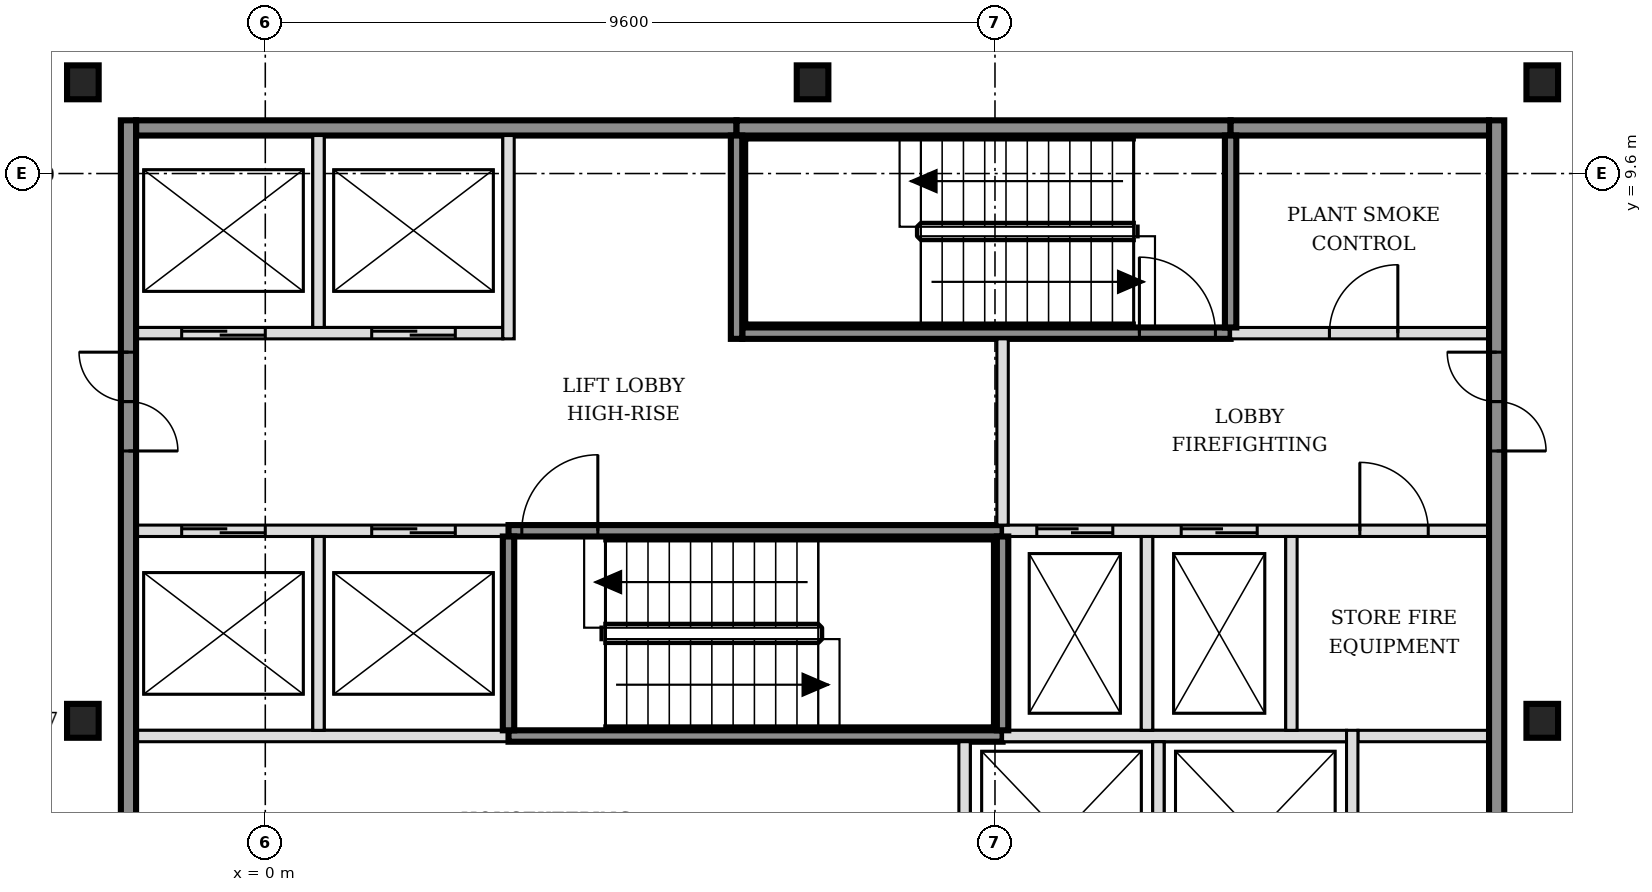
"""IFC4 building model, lengths in metres.
Left out: names, types, materials, properties, quantities, classifications, styles, units other than length and angle.
Written with IfcOpenShell. Run it as: python <this file> out.ifc"""

import sys

from ifc_helpers import new_model, si_unit, direction, frame, frame_2d, origin, origin_2d, place, context, subcontext, project, spatial, rectangle, i_section, extrude, element, fill, save


model = new_model("IFC4")
c1 = context("Model", 3, precision=1e-05, world=origin(), true_north=direction((0.0, 1.0)))
c2 = subcontext(c1, "Body", "Model", "MODEL_VIEW")
j1 = project(units=[si_unit("LENGTHUNIT", "METRE"), si_unit("PLANEANGLEUNIT", "RADIAN")], contexts=[c1])
p1 = place(None, origin())
s1 = spatial("IfcSite", under=j1, at=p1, CompositionType="ELEMENT")
p2 = place(p1, origin())
s2 = spatial("IfcBuilding", under=s1, at=p2, CompositionType="ELEMENT")
p3 = place(p2, frame((0.0, 0.0, 175.8)))
s3 = spatial("IfcBuildingStorey", under=s2, at=p3, CompositionType="ELEMENT", Elevation=175.8)
for number, where, z_axis, x_axis in (
    (1, (-2.4, 2.4, -0.15), (0.0, 0.0, 1.0), (1.0, 0.0, 0.0)),
    (2, (16.8, 2.4, -0.15), (0.0, 0.0, 1.0), (1.0, 0.0, 0.0)),
    (3, (-2.4, 10.8, -0.15), (0.0, 0.0, 1.0), (1.0, 0.0, 0.0)),
    (4, (7.2, 10.8, -0.15), (0.0, 0.0, 1.0), (1.0, 0.0, 0.0)),
    (5, (16.8, 10.8, -0.15), (0.0, 0.0, 1.0), (1.0, 0.0, 0.0)),
):
    element("IfcColumn", number, at=place(p3, frame(where, z_axis=z_axis, x_axis=x_axis)), inside=s3, PredefinedType="COLUMN", context=c2, shape_type="SweptSolid", body=[
        extrude(i_section(OverallWidth=0.416, OverallDepth=0.446, WebThickness=0.039, FlangeThickness=0.063, FilletRadius=0.015, at=origin_2d()), origin(), (0.0, 0.0, 1.0), 3.6),
    ])
p4 = place(p3, frame((-1.7, 2.2, 0.0), z_axis=(0.0, 0.0, 1.0), x_axis=(1.0, 0.0, 0.0)))
e6 = element("IfcWall", 6, at=p4, inside=s3, PredefinedType="SOLIDWALL", context=c2, shape_type="SweptSolid", body=[
    extrude(rectangle(XDim=4.9, YDim=0.15, at=frame_2d((2.45, 0.0))), origin(), (0.0, 0.0, 1.0), 3.45),
])
p5 = place(p3, frame((3.2, 2.2, 0.0), z_axis=(0.0, 0.0, 1.0), x_axis=(1.0, 0.0, 0.0)))
e7 = element("IfcWall", 7, at=p5, inside=s3, PredefinedType="SOLIDWALL", context=c2, shape_type="SweptSolid", body=[
    extrude(rectangle(XDim=6.5, YDim=0.15, at=frame_2d((3.25, 0.0))), origin(), (0.0, 0.0, 1.0), 3.45),
])
p6 = place(p3, frame((9.7, 2.2, 0.0), z_axis=(0.0, 0.0, 1.0), x_axis=(1.0, 0.0, 0.0)))
e8 = element("IfcWall", 8, at=p6, inside=s3, PredefinedType="SOLIDWALL", context=c2, shape_type="SweptSolid", body=[
    extrude(rectangle(XDim=4.525, YDim=0.15, at=frame_2d((2.263, 0.0))), origin(), (0.0, 0.0, 1.0), 3.45),
])
p7 = place(p3, frame((14.375, 2.2, 0.0), z_axis=(0.0, 0.0, 1.0), x_axis=(1.0, 0.0, 0.0)))
e9 = element("IfcWall", 9, at=p7, inside=s3, PredefinedType="PARTITIONING", context=c2, shape_type="SweptSolid", body=[
    extrude(rectangle(XDim=1.725, YDim=0.15, at=frame_2d((0.863, 0.0))), origin(), (0.0, 0.0, 1.0), 3.45),
])
p8 = place(p3, frame((-1.7, 4.9, 0.0), z_axis=(0.0, 0.0, 1.0), x_axis=(1.0, 0.0, 0.0)))
e10 = element("IfcWall", 10, at=p8, inside=s3, PredefinedType="SOLIDWALL", context=c2, shape_type="SweptSolid", body=[
    extrude(rectangle(XDim=4.9, YDim=0.15, at=frame_2d((2.45, 0.0))), origin(), (0.0, 0.0, 1.0), 3.45),
])
p9 = place(p8, frame((0.6, 0.0, 0.0)))
e11 = element("IfcOpeningElement", 11, at=p9, cuts=e10, PredefinedType="OPENING", context=c2, shape_type="SweptSolid", body=[
    extrude(rectangle(XDim=1.1, YDim=2.1, at=frame_2d((0.55, 1.05))), frame((0.0, 0.085, 0.0), z_axis=(0.0, -1.0, 0.0), x_axis=(1.0, 0.0, 0.0)), (0.0, 0.0, 1.0), 0.17),
])
p10 = place(p8, frame((3.1, 0.0, 0.0)))
e12 = element("IfcOpeningElement", 12, at=p10, cuts=e10, PredefinedType="OPENING", context=c2, shape_type="SweptSolid", body=[
    extrude(rectangle(XDim=1.1, YDim=2.1, at=frame_2d((0.55, 1.05))), frame((0.0, 0.085, 0.0), z_axis=(0.0, -1.0, 0.0), x_axis=(1.0, 0.0, 0.0)), (0.0, 0.0, 1.0), 0.17),
])
p11 = place(p3, frame((3.2, 4.9, 0.0), z_axis=(0.0, 0.0, 1.0), x_axis=(1.0, 0.0, 0.0)))
e13 = element("IfcWall", 13, at=p11, inside=s3, PredefinedType="SOLIDWALL", context=c2, shape_type="SweptSolid", body=[
    extrude(rectangle(XDim=6.5, YDim=0.15, at=frame_2d((3.25, 0.0))), origin(), (0.0, 0.0, 1.0), 3.45),
])
p12 = place(p11, frame((0.175, 0.0, 0.0)))
e14 = element("IfcOpeningElement", 14, at=p12, cuts=e13, PredefinedType="OPENING", context=c2, shape_type="SweptSolid", body=[
    extrude(rectangle(XDim=1.0, YDim=2.1, at=frame_2d((0.5, 1.05))), frame((0.0, 0.085, 0.0), z_axis=(0.0, -1.0, 0.0), x_axis=(1.0, 0.0, 0.0)), (0.0, 0.0, 1.0), 0.17),
])
p13 = place(p3, frame((9.7, 4.9, 0.0), z_axis=(0.0, 0.0, 1.0), x_axis=(1.0, 0.0, 0.0)))
e15 = element("IfcWall", 15, at=p13, inside=s3, PredefinedType="SOLIDWALL", context=c2, shape_type="SweptSolid", body=[
    extrude(rectangle(XDim=6.4, YDim=0.15, at=frame_2d((3.2, 0.0))), origin(), (0.0, 0.0, 1.0), 3.45),
])
p14 = place(p13, frame((0.45, 0.0, 0.0)))
e16 = element("IfcOpeningElement", 16, at=p14, cuts=e15, PredefinedType="OPENING", context=c2, shape_type="SweptSolid", body=[
    extrude(rectangle(XDim=1.0, YDim=2.1, at=frame_2d((0.5, 1.05))), frame((0.0, 0.085, 0.0), z_axis=(0.0, -1.0, 0.0), x_axis=(1.0, 0.0, 0.0)), (0.0, 0.0, 1.0), 0.17),
])
p15 = place(p13, frame((2.35, 0.0, 0.0)))
e17 = element("IfcOpeningElement", 17, at=p15, cuts=e15, PredefinedType="OPENING", context=c2, shape_type="SweptSolid", body=[
    extrude(rectangle(XDim=1.0, YDim=2.1, at=frame_2d((0.5, 1.05))), frame((0.0, 0.085, 0.0), z_axis=(0.0, -1.0, 0.0), x_axis=(1.0, 0.0, 0.0)), (0.0, 0.0, 1.0), 0.17),
])
p16 = place(p13, frame((4.7, 0.0, 0.0)))
e18 = element("IfcOpeningElement", 18, at=p16, cuts=e15, PredefinedType="OPENING", context=c2, shape_type="SweptSolid", body=[
    extrude(rectangle(XDim=0.9, YDim=2.1, at=frame_2d((0.45, 1.05))), frame((0.0, 0.085, 0.0), z_axis=(0.0, -1.0, 0.0), x_axis=(1.0, 0.0, 0.0)), (0.0, 0.0, 1.0), 0.17),
])
p17 = place(p3, frame((-1.7, 7.5, 0.0), z_axis=(0.0, 0.0, 1.0), x_axis=(1.0, 0.0, 0.0)))
e19 = element("IfcWall", 19, at=p17, inside=s3, PredefinedType="SOLIDWALL", context=c2, shape_type="SweptSolid", body=[
    extrude(rectangle(XDim=4.825, YDim=0.15, at=frame_2d((2.413, 0.0))), origin(), (0.0, 0.0, 1.0), 3.45),
])
p18 = place(p17, frame((0.6, 0.0, 0.0)))
e20 = element("IfcOpeningElement", 20, at=p18, cuts=e19, PredefinedType="OPENING", context=c2, shape_type="SweptSolid", body=[
    extrude(rectangle(XDim=1.1, YDim=2.1, at=frame_2d((0.55, 1.05))), frame((0.0, 0.085, 0.0), z_axis=(0.0, -1.0, 0.0), x_axis=(1.0, 0.0, 0.0)), (0.0, 0.0, 1.0), 0.17),
])
p19 = place(p17, frame((3.1, 0.0, 0.0)))
e21 = element("IfcOpeningElement", 21, at=p19, cuts=e19, PredefinedType="OPENING", context=c2, shape_type="SweptSolid", body=[
    extrude(rectangle(XDim=1.1, YDim=2.1, at=frame_2d((0.55, 1.05))), frame((0.0, 0.085, 0.0), z_axis=(0.0, -1.0, 0.0), x_axis=(1.0, 0.0, 0.0)), (0.0, 0.0, 1.0), 0.17),
])
p20 = place(p3, frame((6.275, 7.5, 0.0), z_axis=(0.0, 0.0, 1.0), x_axis=(1.0, 0.0, 0.0)))
e22 = element("IfcWall", 22, at=p20, inside=s3, PredefinedType="SOLIDWALL", context=c2, shape_type="SweptSolid", body=[
    extrude(rectangle(XDim=6.425, YDim=0.15, at=frame_2d((3.212, 0.0))), origin(), (0.0, 0.0, 1.0), 3.45),
])
p21 = place(p20, frame((5.225, 0.0, 0.0)))
e23 = element("IfcOpeningElement", 23, at=p21, cuts=e22, PredefinedType="OPENING", context=c2, shape_type="SweptSolid", body=[
    extrude(rectangle(XDim=1.0, YDim=2.1, at=frame_2d((0.5, 1.05))), frame((0.0, 0.085, 0.0), z_axis=(0.0, -1.0, 0.0), x_axis=(1.0, 0.0, 0.0)), (0.0, 0.0, 1.0), 0.17),
])
p22 = place(p3, frame((12.7, 7.5, 0.0), z_axis=(0.0, 0.0, 1.0), x_axis=(1.0, 0.0, 0.0)))
e24 = element("IfcWall", 24, at=p22, inside=s3, PredefinedType="SOLIDWALL", context=c2, shape_type="SweptSolid", body=[
    extrude(rectangle(XDim=3.4, YDim=0.15, at=frame_2d((1.7, 0.0))), origin(), (0.0, 0.0, 1.0), 3.45),
])
p23 = place(p22, frame((1.3, 0.0, 0.0)))
e25 = element("IfcOpeningElement", 25, at=p23, cuts=e24, PredefinedType="OPENING", context=c2, shape_type="SweptSolid", body=[
    extrude(rectangle(XDim=0.9, YDim=2.1, at=frame_2d((0.45, 1.05))), frame((0.0, 0.085, 0.0), z_axis=(0.0, -1.0, 0.0), x_axis=(1.0, 0.0, 0.0)), (0.0, 0.0, 1.0), 0.17),
])
p24 = place(p3, frame((-1.7, 10.2, 0.0), z_axis=(0.0, 0.0, 1.0), x_axis=(1.0, 0.0, 0.0)))
e26 = element("IfcWall", 26, at=p24, inside=s3, PredefinedType="SOLIDWALL", context=c2, shape_type="SweptSolid", body=[
    extrude(rectangle(XDim=7.9, YDim=0.2, at=frame_2d((3.95, 0.0))), origin(), (0.0, 0.0, 1.0), 3.45),
])
p25 = place(p3, frame((6.2, 10.2, 0.0), z_axis=(0.0, 0.0, 1.0), x_axis=(1.0, 0.0, 0.0)))
e27 = element("IfcWall", 27, at=p25, inside=s3, PredefinedType="SOLIDWALL", context=c2, shape_type="SweptSolid", body=[
    extrude(rectangle(XDim=6.5, YDim=0.2, at=frame_2d((3.25, 0.0))), origin(), (0.0, 0.0, 1.0), 3.45),
])
p26 = place(p3, frame((12.7, 10.2, 0.0), z_axis=(0.0, 0.0, 1.0), x_axis=(1.0, 0.0, 0.0)))
e28 = element("IfcWall", 28, at=p26, inside=s3, PredefinedType="SOLIDWALL", context=c2, shape_type="SweptSolid", body=[
    extrude(rectangle(XDim=3.4, YDim=0.2, at=frame_2d((1.7, 0.0))), origin(), (0.0, 0.0, 1.0), 3.45),
])
p27 = place(p3, frame((-1.8, -5.5, 0.0), z_axis=(0.0, 0.0, 1.0), x_axis=(0.0, 1.0, 0.0)))
e29 = element("IfcWall", 29, at=p27, inside=s3, PredefinedType="SOLIDWALL", context=c2, shape_type="SweptSolid", body=[
    extrude(rectangle(XDim=15.8, YDim=0.2, at=frame_2d((7.9, 0.0))), origin(), (0.0, 0.0, 1.0), 3.45),
])
p28 = place(p27, frame((3.05, 0.0, 0.0)))
e30 = element("IfcOpeningElement", 30, at=p28, cuts=e29, PredefinedType="OPENING", context=c2, shape_type="SweptSolid", body=[
    extrude(rectangle(XDim=1.3, YDim=2.1, at=frame_2d((0.65, 1.05))), frame((0.0, 0.11, 0.0), z_axis=(0.0, -1.0, 0.0), x_axis=(1.0, 0.0, 0.0)), (0.0, 0.0, 1.0), 0.22),
])
p29 = place(p27, frame((11.45, 0.0, 0.0)))
e31 = element("IfcOpeningElement", 31, at=p29, cuts=e29, PredefinedType="OPENING", context=c2, shape_type="SweptSolid", body=[
    extrude(rectangle(XDim=1.3, YDim=2.1, at=frame_2d((0.65, 1.05))), frame((0.0, 0.11, 0.0), z_axis=(0.0, -1.0, 0.0), x_axis=(1.0, 0.0, 0.0)), (0.0, 0.0, 1.0), 0.22),
])
p30 = place(p3, frame((0.7, 2.275, 0.0), z_axis=(0.0, 0.0, 1.0), x_axis=(0.0, 1.0, 0.0)))
e32 = element("IfcWall", 32, at=p30, inside=s3, PredefinedType="SOLIDWALL", context=c2, shape_type="SweptSolid", body=[
    extrude(rectangle(XDim=2.55, YDim=0.15, at=frame_2d((1.275, 0.0))), origin(), (0.0, 0.0, 1.0), 3.45),
])
p31 = place(p3, frame((0.7, 7.575, 0.0), z_axis=(0.0, 0.0, 1.0), x_axis=(0.0, 1.0, 0.0)))
e33 = element("IfcWall", 33, at=p31, inside=s3, PredefinedType="SOLIDWALL", context=c2, shape_type="SweptSolid", body=[
    extrude(rectangle(XDim=2.525, YDim=0.15, at=frame_2d((1.263, 0.0))), origin(), (0.0, 0.0, 1.0), 3.45),
])
p32 = place(p3, frame((3.2, 2.275, 0.0), z_axis=(0.0, 0.0, 1.0), x_axis=(0.0, 1.0, 0.0)))
e34 = element("IfcWall", 34, at=p32, inside=s3, PredefinedType="SOLIDWALL", context=c2, shape_type="SweptSolid", body=[
    extrude(rectangle(XDim=2.55, YDim=0.15, at=frame_2d((1.275, 0.0))), origin(), (0.0, 0.0, 1.0), 3.45),
])
for number, where, z_axis, x_axis in (
    (35, (3.2, 7.425, 0.0), (0.0, 0.0, 1.0), (0.0, 1.0, 0.0)),
    (36, (6.2, 7.425, 0.0), (0.0, 0.0, 1.0), (0.0, 1.0, 0.0)),
):
    element("IfcWall", number, at=place(p3, frame(where, z_axis=z_axis, x_axis=x_axis)), inside=s3, PredefinedType="SOLIDWALL", context=c2, shape_type="SweptSolid", body=[
        extrude(rectangle(XDim=2.675, YDim=0.15, at=frame_2d((1.337, 0.0))), origin(), (0.0, 0.0, 1.0), 3.45),
    ])
p33 = place(p3, frame((9.2, -0.475, 0.0), z_axis=(0.0, 0.0, 1.0), x_axis=(0.0, 1.0, 0.0)))
e37 = element("IfcWall", 37, at=p33, inside=s3, PredefinedType="SOLIDWALL", context=c2, shape_type="SweptSolid", body=[
    extrude(rectangle(XDim=2.6, YDim=0.15, at=frame_2d((1.3, 0.0))), origin(), (0.0, 0.0, 1.0), 3.45),
])
p34 = place(p3, frame((9.7, 2.275, 0.0), z_axis=(0.0, 0.0, 1.0), x_axis=(0.0, 1.0, 0.0)))
e38 = element("IfcWall", 38, at=p34, inside=s3, PredefinedType="SOLIDWALL", context=c2, shape_type="SweptSolid", body=[
    extrude(rectangle(XDim=2.55, YDim=0.15, at=frame_2d((1.275, 0.0))), origin(), (0.0, 0.0, 1.0), 3.45),
])
p35 = place(p3, frame((9.7, 4.975, 0.0), z_axis=(0.0, 0.0, 1.0), x_axis=(0.0, 1.0, 0.0)))
e39 = element("IfcWall", 39, at=p35, inside=s3, PredefinedType="SOLIDWALL", context=c2, shape_type="SweptSolid", body=[
    extrude(rectangle(XDim=2.45, YDim=0.15, at=frame_2d((1.225, 0.0))), origin(), (0.0, 0.0, 1.0), 3.45),
])
p36 = place(p3, frame((11.6, 2.275, 0.0), z_axis=(0.0, 0.0, 1.0), x_axis=(0.0, 1.0, 0.0)))
e40 = element("IfcWall", 40, at=p36, inside=s3, PredefinedType="SOLIDWALL", context=c2, shape_type="SweptSolid", body=[
    extrude(rectangle(XDim=2.55, YDim=0.15, at=frame_2d((1.275, 0.0))), origin(), (0.0, 0.0, 1.0), 3.45),
])
p37 = place(p3, frame((11.75, -0.325, 0.0), z_axis=(0.0, 0.0, 1.0), x_axis=(0.0, 1.0, 0.0)))
e41 = element("IfcWall", 41, at=p37, inside=s3, PredefinedType="SOLIDWALL", context=c2, shape_type="SweptSolid", body=[
    extrude(rectangle(XDim=2.45, YDim=0.15, at=frame_2d((1.225, 0.0))), origin(), (0.0, 0.0, 1.0), 3.45),
])
p38 = place(p3, frame((12.7, 7.575, 0.0), z_axis=(0.0, 0.0, 1.0), x_axis=(0.0, 1.0, 0.0)))
e42 = element("IfcWall", 42, at=p38, inside=s3, PredefinedType="SOLIDWALL", context=c2, shape_type="SweptSolid", body=[
    extrude(rectangle(XDim=2.525, YDim=0.15, at=frame_2d((1.263, 0.0))), origin(), (0.0, 0.0, 1.0), 3.45),
])
p39 = place(p3, frame((13.5, 2.275, 0.0), z_axis=(0.0, 0.0, 1.0), x_axis=(0.0, 1.0, 0.0)))
e43 = element("IfcWall", 43, at=p39, inside=s3, PredefinedType="SOLIDWALL", context=c2, shape_type="SweptSolid", body=[
    extrude(rectangle(XDim=2.55, YDim=0.15, at=frame_2d((1.275, 0.0))), origin(), (0.0, 0.0, 1.0), 3.45),
])
p40 = place(p3, frame((14.3, -0.475, 0.0), z_axis=(0.0, 0.0, 1.0), x_axis=(0.0, 1.0, 0.0)))
e44 = element("IfcWall", 44, at=p40, inside=s3, PredefinedType="SOLIDWALL", context=c2, shape_type="SweptSolid", body=[
    extrude(rectangle(XDim=2.75, YDim=0.15, at=frame_2d((1.375, 0.0))), origin(), (0.0, 0.0, 1.0), 3.45),
])
p41 = place(p3, frame((16.2, -5.5, 0.0), z_axis=(0.0, 0.0, 1.0), x_axis=(0.0, 1.0, 0.0)))
e45 = element("IfcWall", 45, at=p41, inside=s3, PredefinedType="SOLIDWALL", context=c2, shape_type="SweptSolid", body=[
    extrude(rectangle(XDim=15.8, YDim=0.2, at=frame_2d((7.9, 0.0))), origin(), (0.0, 0.0, 1.0), 3.45),
])
p42 = place(p41, frame((3.05, 0.0, 0.0)))
e46 = element("IfcOpeningElement", 46, at=p42, cuts=e45, PredefinedType="OPENING", context=c2, shape_type="SweptSolid", body=[
    extrude(rectangle(XDim=1.3, YDim=2.1, at=frame_2d((0.65, 1.05))), frame((0.0, 0.11, 0.0), z_axis=(0.0, -1.0, 0.0), x_axis=(1.0, 0.0, 0.0)), (0.0, 0.0, 1.0), 0.22),
])
p43 = place(p41, frame((11.45, 0.0, 0.0)))
e47 = element("IfcOpeningElement", 47, at=p43, cuts=e45, PredefinedType="OPENING", context=c2, shape_type="SweptSolid", body=[
    extrude(rectangle(XDim=1.3, YDim=2.1, at=frame_2d((0.65, 1.05))), frame((0.0, 0.11, 0.0), z_axis=(0.0, -1.0, 0.0), x_axis=(1.0, 0.0, 0.0)), (0.0, 0.0, 1.0), 0.22),
])
p44 = place(p9, origin())
e48 = element("IfcDoor", 48, at=p44, inside=s3, OperationType="DOUBLE_DOOR_SLIDING", PredefinedType="DOOR", context=c2, shape_type="SweptSolid", body=[
    extrude(rectangle(XDim=1.1, YDim=2.1, at=frame_2d((0.55, 1.05))), frame((0.0, 0.025, 0.0), z_axis=(0.0, -1.0, 0.0), x_axis=(1.0, 0.0, 0.0)), (0.0, 0.0, 1.0), 0.05),
])
fill(e11, e48)
p45 = place(p10, origin())
e49 = element("IfcDoor", 49, at=p45, inside=s3, OperationType="DOUBLE_DOOR_SLIDING", PredefinedType="DOOR", context=c2, shape_type="SweptSolid", body=[
    extrude(rectangle(XDim=1.1, YDim=2.1, at=frame_2d((0.55, 1.05))), frame((0.0, 0.025, 0.0), z_axis=(0.0, -1.0, 0.0), x_axis=(1.0, 0.0, 0.0)), (0.0, 0.0, 1.0), 0.05),
])
fill(e12, e49)
p46 = place(p18, origin())
e50 = element("IfcDoor", 50, at=p46, inside=s3, OperationType="DOUBLE_DOOR_SLIDING", PredefinedType="DOOR", context=c2, shape_type="SweptSolid", body=[
    extrude(rectangle(XDim=1.1, YDim=2.1, at=frame_2d((0.55, 1.05))), frame((0.0, 0.025, 0.0), z_axis=(0.0, -1.0, 0.0), x_axis=(1.0, 0.0, 0.0)), (0.0, 0.0, 1.0), 0.05),
])
fill(e20, e50)
p47 = place(p19, origin())
e51 = element("IfcDoor", 51, at=p47, inside=s3, OperationType="DOUBLE_DOOR_SLIDING", PredefinedType="DOOR", context=c2, shape_type="SweptSolid", body=[
    extrude(rectangle(XDim=1.1, YDim=2.1, at=frame_2d((0.55, 1.05))), frame((0.0, 0.025, 0.0), z_axis=(0.0, -1.0, 0.0), x_axis=(1.0, 0.0, 0.0)), (0.0, 0.0, 1.0), 0.05),
])
fill(e21, e51)
p48 = place(p14, origin())
e52 = element("IfcDoor", 52, at=p48, inside=s3, OperationType="DOUBLE_DOOR_SLIDING", PredefinedType="DOOR", context=c2, shape_type="SweptSolid", body=[
    extrude(rectangle(XDim=1.0, YDim=2.1, at=frame_2d((0.5, 1.05))), frame((0.0, 0.025, 0.0), z_axis=(0.0, -1.0, 0.0), x_axis=(1.0, 0.0, 0.0)), (0.0, 0.0, 1.0), 0.05),
])
fill(e16, e52)
p49 = place(p15, origin())
e53 = element("IfcDoor", 53, at=p49, inside=s3, OperationType="DOUBLE_DOOR_SLIDING", PredefinedType="DOOR", context=c2, shape_type="SweptSolid", body=[
    extrude(rectangle(XDim=1.0, YDim=2.1, at=frame_2d((0.5, 1.05))), frame((0.0, 0.025, 0.0), z_axis=(0.0, -1.0, 0.0), x_axis=(1.0, 0.0, 0.0)), (0.0, 0.0, 1.0), 0.05),
])
fill(e17, e53)
p50 = place(p12, origin())
e54 = element("IfcDoor", 54, at=p50, inside=s3, OperationType="SINGLE_SWING_RIGHT", PredefinedType="DOOR", context=c2, shape_type="SweptSolid", body=[
    extrude(rectangle(XDim=1.0, YDim=2.1, at=frame_2d((0.5, 1.05))), frame((0.0, 0.025, 0.0), z_axis=(0.0, -1.0, 0.0), x_axis=(1.0, 0.0, 0.0)), (0.0, 0.0, 1.0), 0.05),
])
fill(e14, e54)
p51 = place(p21, origin())
e55 = element("IfcDoor", 55, at=p51, inside=s3, OperationType="SINGLE_SWING_LEFT", PredefinedType="DOOR", context=c2, shape_type="SweptSolid", body=[
    extrude(rectangle(XDim=1.0, YDim=2.1, at=frame_2d((0.5, 1.05))), frame((0.0, 0.025, 0.0), z_axis=(0.0, -1.0, 0.0), x_axis=(1.0, 0.0, 0.0)), (0.0, 0.0, 1.0), 0.05),
])
fill(e23, e55)
p52 = place(p29, origin())
e56 = element("IfcDoor", 56, at=p52, inside=s3, OperationType="DOUBLE_DOOR_SINGLE_SWING", PredefinedType="DOOR", context=c2, shape_type="SweptSolid", body=[
    extrude(rectangle(XDim=1.3, YDim=2.1, at=frame_2d((0.65, 1.05))), frame((0.0, 0.025, 0.0), z_axis=(0.0, -1.0, 0.0), x_axis=(1.0, 0.0, 0.0)), (0.0, 0.0, 1.0), 0.05),
])
fill(e31, e56)
p53 = place(p43, origin())
e57 = element("IfcDoor", 57, at=p53, inside=s3, OperationType="DOUBLE_DOOR_SINGLE_SWING", PredefinedType="DOOR", context=c2, shape_type="SweptSolid", body=[
    extrude(rectangle(XDim=1.3, YDim=2.1, at=frame_2d((0.65, 1.05))), frame((0.0, 0.025, 0.0), z_axis=(0.0, -1.0, 0.0), x_axis=(1.0, 0.0, 0.0)), (0.0, 0.0, 1.0), 0.05),
])
fill(e47, e57)
p54 = place(p16, origin())
e58 = element("IfcDoor", 58, at=p54, inside=s3, OperationType="SINGLE_SWING_LEFT", PredefinedType="DOOR", context=c2, shape_type="SweptSolid", body=[
    extrude(rectangle(XDim=0.9, YDim=2.1, at=frame_2d((0.45, 1.05))), frame((0.0, 0.025, 0.0), z_axis=(0.0, -1.0, 0.0), x_axis=(1.0, 0.0, 0.0)), (0.0, 0.0, 1.0), 0.05),
])
fill(e18, e58)
p55 = place(p23, origin())
e59 = element("IfcDoor", 59, at=p55, inside=s3, OperationType="SINGLE_SWING_RIGHT", PredefinedType="DOOR", context=c2, shape_type="SweptSolid", body=[
    extrude(rectangle(XDim=0.9, YDim=2.1, at=frame_2d((0.45, 1.05))), frame((0.0, 0.025, 0.0), z_axis=(0.0, -1.0, 0.0), x_axis=(1.0, 0.0, 0.0)), (0.0, 0.0, 1.0), 0.05),
])
fill(e25, e59)
save(model, sys.argv[1])
